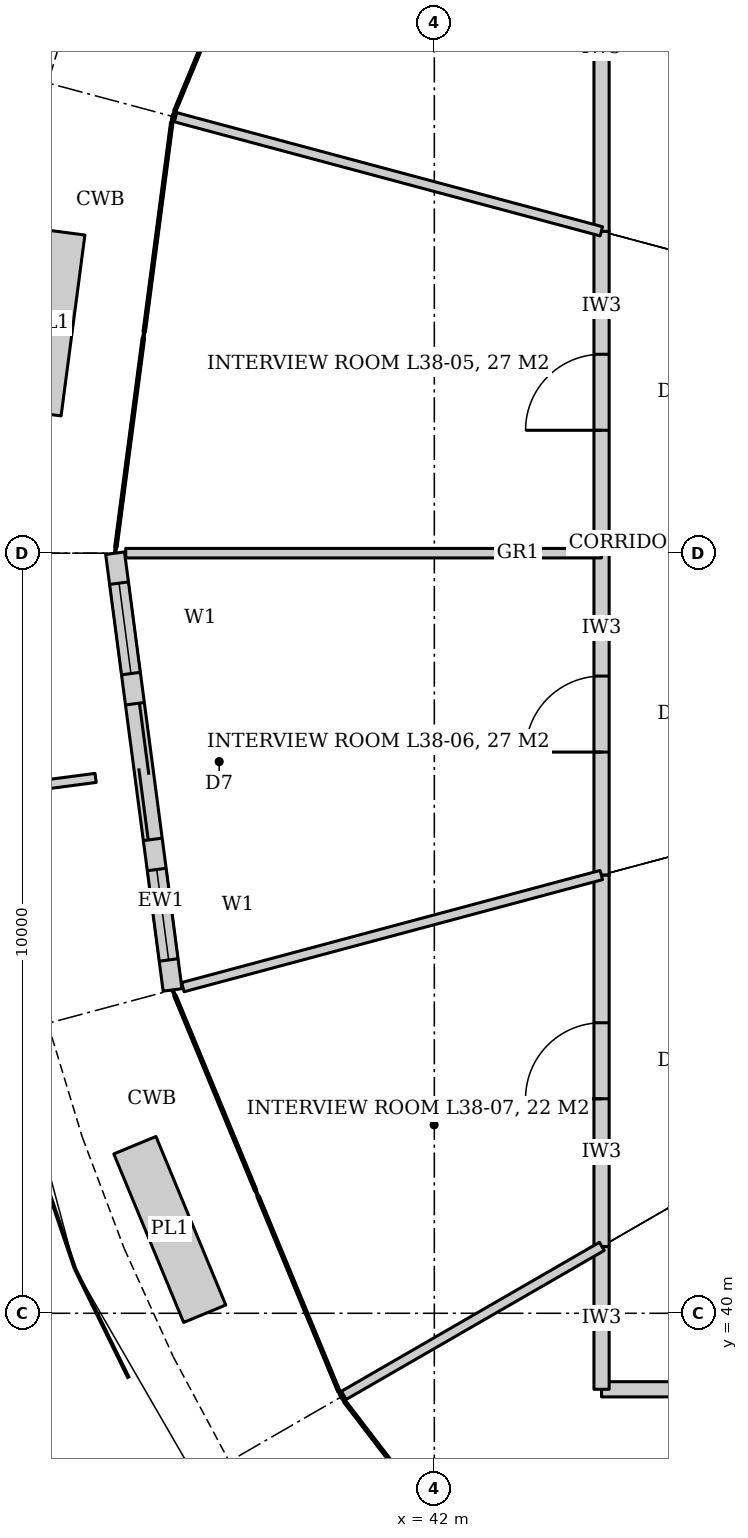
"""IFC4 building model, lengths in metres.
Left out: names, types, materials, properties, quantities, classifications, styles, units other than length and angle.
Written with IfcOpenShell. Run it as: python <this file> out.ifc"""

import sys

from ifc_helpers import new_model, si_unit, direction, frame, frame_2d, origin, place, context, subcontext, project, spatial, rectangle, extrude, element, fill, save


model = new_model("IFC4")
c1 = context("Model", 3, precision=1e-05, world=origin(), true_north=direction((0.0, 1.0)))
c2 = subcontext(c1, "Body", "Model", "MODEL_VIEW")
j1 = project(units=[si_unit("LENGTHUNIT", "METRE"), si_unit("PLANEANGLEUNIT", "RADIAN")], contexts=[c1])
p1 = place(None, origin())
s1 = spatial("IfcSite", under=j1, at=p1, CompositionType="ELEMENT")
p2 = place(p1, origin())
s2 = spatial("IfcBuilding", under=s1, at=p2, CompositionType="ELEMENT")
p3 = place(p2, frame((0.0, 0.0, 160.4)))
s3 = spatial("IfcBuildingStorey", under=s2, at=p3, CompositionType="ELEMENT", Elevation=160.4)
p4 = place(p3, frame((47.0, 39.0, 0.0), z_axis=(0.0, 0.0, 1.0), x_axis=(-1.0, 0.0, 0.0)))
e1 = element("IfcWall", 1, at=p4, inside=s3, PredefinedType="PARTITIONING", context=c2, shape_type="SweptSolid", body=[
    extrude(rectangle(XDim=2.8, YDim=0.2, at=frame_2d((1.4, 0.0))), origin(), (0.0, 0.0, 1.0), 3.04),
])
p5 = place(p3, frame((44.2, 39.0, 0.0), z_axis=(0.0, 0.0, 1.0), x_axis=(0.0, 1.0, 0.0)))
e2 = element("IfcWall", 2, at=p5, inside=s3, PredefinedType="PARTITIONING", context=c2, shape_type="SweptSolid", body=[
    extrude(rectangle(XDim=1.878, YDim=0.2, at=frame_2d((0.939, 0.0))), origin(), (0.0, 0.0, 1.0), 3.012),
])
p6 = place(p3, frame((44.2, 40.878, 0.0), z_axis=(0.0, 0.0, 1.0), x_axis=(0.0, 1.0, 0.0)))
e3 = element("IfcWall", 3, at=p6, inside=s3, PredefinedType="PARTITIONING", context=c2, shape_type="SweptSolid", body=[
    extrude(rectangle(XDim=4.888, YDim=0.2, at=frame_2d((2.444, 0.0))), origin(), (0.0, 0.0, 1.0), 3.012),
])
p7 = place(p6, frame((1.944, 0.0, 0.0)))
e4 = element("IfcOpeningElement", 4, at=p7, cuts=e3, PredefinedType="OPENING", context=c2, shape_type="SweptSolid", body=[
    extrude(rectangle(XDim=1.0, YDim=2.4, at=frame_2d((0.5, 1.2))), frame((0.0, 0.11, 0.0), z_axis=(0.0, -1.0, 0.0), x_axis=(1.0, 0.0, 0.0)), (0.0, 0.0, 1.0), 0.22),
])
p8 = place(p3, frame((44.2, 45.766, 0.0), z_axis=(0.0, 0.0, 1.0), x_axis=(0.0, 1.0, 0.0)))
e5 = element("IfcWall", 5, at=p8, inside=s3, PredefinedType="PARTITIONING", context=c2, shape_type="SweptSolid", body=[
    extrude(rectangle(XDim=4.234, YDim=0.2, at=frame_2d((2.117, 0.0))), origin(), (0.0, 0.0, 1.0), 3.012),
])
p9 = place(p8, frame((1.617, 0.0, 0.0)))
e6 = element("IfcOpeningElement", 6, at=p9, cuts=e5, PredefinedType="OPENING", context=c2, shape_type="SweptSolid", body=[
    extrude(rectangle(XDim=1.0, YDim=2.4, at=frame_2d((0.5, 1.2))), frame((0.0, 0.11, 0.0), z_axis=(0.0, -1.0, 0.0), x_axis=(1.0, 0.0, 0.0)), (0.0, 0.0, 1.0), 0.22),
])
p10 = place(p3, frame((44.2, 50.0, 0.0), z_axis=(0.0, 0.0, 1.0), x_axis=(0.0, 1.0, 0.0)))
e7 = element("IfcWall", 7, at=p10, inside=s3, PredefinedType="PARTITIONING", context=c2, shape_type="SweptSolid", body=[
    extrude(rectangle(XDim=4.234, YDim=0.2, at=frame_2d((2.117, 0.0))), origin(), (0.0, 0.0, 1.0), 3.012),
])
p11 = place(p10, frame((1.617, 0.0, 0.0)))
e8 = element("IfcOpeningElement", 8, at=p11, cuts=e7, PredefinedType="OPENING", context=c2, shape_type="SweptSolid", body=[
    extrude(rectangle(XDim=1.0, YDim=2.4, at=frame_2d((0.5, 1.2))), frame((0.0, 0.11, 0.0), z_axis=(0.0, -1.0, 0.0), x_axis=(1.0, 0.0, 0.0)), (0.0, 0.0, 1.0), 0.22),
])
p12 = place(p3, frame((44.2, 54.234, 0.0), z_axis=(0.0, 0.0, 1.0), x_axis=(0.0, 1.0, 0.0)))
e9 = element("IfcWall", 9, at=p12, inside=s3, PredefinedType="PARTITIONING", context=c2, shape_type="SweptSolid", body=[
    extrude(rectangle(XDim=4.816, YDim=0.2, at=frame_2d((2.408, 0.0))), origin(), (0.0, 0.0, 1.0), 3.012),
])
p13 = place(p3, frame((44.198, 54.234, 0.0), z_axis=(0.0, 0.0, 1.0), x_axis=(-0.965933460469, 0.258790552276, 0.0)))
e10 = element("IfcWall", 10, at=p13, inside=s3, PredefinedType="PARTITIONING", context=c2, shape_type="SweptSolid", body=[
    extrude(rectangle(XDim=5.9, YDim=0.125, at=frame_2d((2.95, 0.0))), origin(), (0.0, 0.0, 1.0), 3.012),
])
p14 = place(p3, frame((44.2, 50.0, 0.0), z_axis=(0.0, 0.0, 1.0), x_axis=(-1.0, 0.0, 0.0)))
e11 = element("IfcWall", 11, at=p14, inside=s3, PredefinedType="PARTITIONING", context=c2, shape_type="SweptSolid", body=[
    extrude(rectangle(XDim=6.36, YDim=0.125, at=frame_2d((3.18, 0.0))), origin(), (0.0, 0.0, 1.0), 3.012),
])
p15 = place(p3, frame((44.198, 45.766, 0.0), z_axis=(0.0, 0.0, 1.0), x_axis=(-0.965932457036, -0.258794297549, 0.0)))
e12 = element("IfcWall", 12, at=p15, inside=s3, PredefinedType="PARTITIONING", context=c2, shape_type="SweptSolid", body=[
    extrude(rectangle(XDim=5.8, YDim=0.125, at=frame_2d((2.9, 0.0))), origin(), (0.0, 0.0, 1.0), 3.012),
])
p16 = place(p3, frame((44.204, 40.88, 0.0), z_axis=(0.0, 0.0, 1.0), x_axis=(-0.866036909293, -0.499980071345, 0.0)))
e13 = element("IfcWall", 13, at=p16, inside=s3, PredefinedType="PARTITIONING", context=c2, shape_type="SweptSolid", body=[
    extrude(rectangle(XDim=4.02, YDim=0.125, at=frame_2d((2.01, 0.0))), origin(), (0.0, 0.0, 1.0), 3.012),
])
p17 = place(p3, frame((37.7, 50.0, 0.0), z_axis=(0.0, 0.0, 1.0), x_axis=(0.130551062135, -0.99144158687, 0.0)))
e14 = element("IfcWall", 14, at=p17, inside=s3, PredefinedType="SOLIDWALL", context=c2, shape_type="SweptSolid", body=[
    extrude(rectangle(XDim=5.822, YDim=0.25, at=frame_2d((2.911, 0.0))), origin(), (0.0, 0.0, 1.0), 4.04),
])
p18 = place(p17, frame((2.011, 0.0, 0.0)))
e15 = element("IfcOpeningElement", 15, at=p18, cuts=e14, PredefinedType="OPENING", context=c2, shape_type="SweptSolid", body=[
    extrude(rectangle(XDim=1.8, YDim=2.4, at=frame_2d((0.9, 1.2))), frame((0.0, 0.135, 0.0), z_axis=(0.0, -1.0, 0.0), x_axis=(1.0, 0.0, 0.0)), (0.0, 0.0, 1.0), 0.27),
])
p19 = place(p17, frame((0.411, 0.0, 0.0)))
e16 = element("IfcOpeningElement", 16, at=p19, cuts=e14, PredefinedType="OPENING", context=c2, shape_type="SweptSolid", body=[
    extrude(rectangle(XDim=1.2, YDim=2.4, at=frame_2d((0.6, 1.2))), frame((0.0, 0.135, 0.0), z_axis=(0.0, -1.0, 0.0), x_axis=(1.0, 0.0, 0.0)), (0.0, 0.0, 1.0), 0.27),
])
p20 = place(p17, frame((4.211, 0.0, 0.0)))
e17 = element("IfcOpeningElement", 17, at=p20, cuts=e14, PredefinedType="OPENING", context=c2, shape_type="SweptSolid", body=[
    extrude(rectangle(XDim=1.2, YDim=2.4, at=frame_2d((0.6, 1.2))), frame((0.0, 0.135, 0.0), z_axis=(0.0, -1.0, 0.0), x_axis=(1.0, 0.0, 0.0)), (0.0, 0.0, 1.0), 0.27),
])
p21 = place(p11, origin())
e18 = element("IfcDoor", 18, at=p21, inside=s3, OperationType="SINGLE_SWING_LEFT", PredefinedType="DOOR", context=c2, shape_type="SweptSolid", body=[
    extrude(rectangle(XDim=1.0, YDim=2.4, at=frame_2d((0.5, 1.2))), frame((0.0, 0.025, 0.0), z_axis=(0.0, -1.0, 0.0), x_axis=(1.0, 0.0, 0.0)), (0.0, 0.0, 1.0), 0.05),
])
fill(e8, e18)
p22 = place(p9, origin())
e19 = element("IfcDoor", 19, at=p22, inside=s3, OperationType="SINGLE_SWING_LEFT", PredefinedType="DOOR", context=c2, shape_type="SweptSolid", body=[
    extrude(rectangle(XDim=1.0, YDim=2.4, at=frame_2d((0.5, 1.2))), frame((0.0, 0.025, 0.0), z_axis=(0.0, -1.0, 0.0), x_axis=(1.0, 0.0, 0.0)), (0.0, 0.0, 1.0), 0.05),
])
fill(e6, e19)
p23 = place(p7, origin())
e20 = element("IfcDoor", 20, at=p23, inside=s3, OperationType="SINGLE_SWING_LEFT", PredefinedType="DOOR", context=c2, shape_type="SweptSolid", body=[
    extrude(rectangle(XDim=1.0, YDim=2.4, at=frame_2d((0.5, 1.2))), frame((0.0, 0.025, 0.0), z_axis=(0.0, -1.0, 0.0), x_axis=(1.0, 0.0, 0.0)), (0.0, 0.0, 1.0), 0.05),
])
fill(e4, e20)
p24 = place(p18, origin())
e21 = element("IfcDoor", 21, at=p24, inside=s3, OperationType="DOUBLE_DOOR_SLIDING", PredefinedType="DOOR", context=c2, shape_type="SweptSolid", body=[
    extrude(rectangle(XDim=1.8, YDim=2.4, at=frame_2d((0.9, 1.2))), frame((0.0, 0.025, 0.0), z_axis=(0.0, -1.0, 0.0), x_axis=(1.0, 0.0, 0.0)), (0.0, 0.0, 1.0), 0.05),
])
fill(e15, e21)
p25 = place(p19, origin())
e22 = element("IfcWindow", 22, at=p25, inside=s3, PartitioningType="SINGLE_PANEL", PredefinedType="WINDOW", context=c2, shape_type="SweptSolid", body=[
    extrude(rectangle(XDim=1.2, YDim=2.4, at=frame_2d((0.6, 1.2))), frame((0.0, 0.03, 0.0), z_axis=(0.0, -1.0, 0.0), x_axis=(1.0, 0.0, 0.0)), (0.0, 0.0, 1.0), 0.06),
])
fill(e16, e22)
p26 = place(p20, origin())
e23 = element("IfcWindow", 23, at=p26, inside=s3, PartitioningType="SINGLE_PANEL", PredefinedType="WINDOW", context=c2, shape_type="SweptSolid", body=[
    extrude(rectangle(XDim=1.2, YDim=2.4, at=frame_2d((0.6, 1.2))), frame((0.0, 0.03, 0.0), z_axis=(0.0, -1.0, 0.0), x_axis=(1.0, 0.0, 0.0)), (0.0, 0.0, 1.0), 0.06),
])
fill(e17, e23)
save(model, sys.argv[1])
